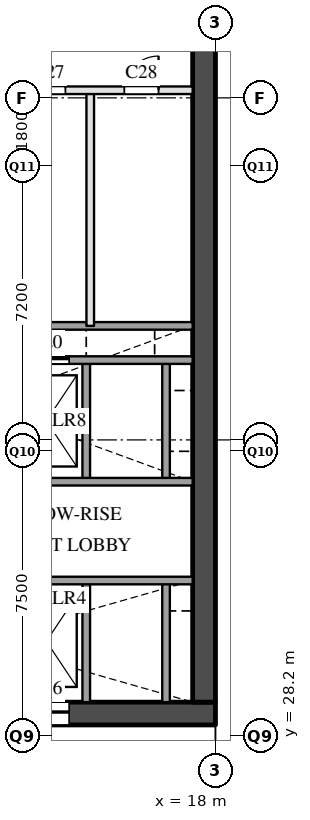
"""IFC4 building model, lengths in metres.
Left out: names, types, materials, properties, quantities, classifications, styles, units other than length and angle.
Written with IfcOpenShell. Run it as: python <this file> out.ifc"""

import sys

from ifc_helpers import new_model, si_unit, direction, frame, frame_2d, origin, place, context, subcontext, project, spatial, rectangle, extrude, element, fill, save


model = new_model("IFC4")
c1 = context("Model", 3, precision=1e-05, world=origin(), true_north=direction((0.0, 1.0)))
c2 = subcontext(c1, "Body", "Model", "MODEL_VIEW")
j1 = project(units=[si_unit("LENGTHUNIT", "METRE"), si_unit("PLANEANGLEUNIT", "RADIAN")], contexts=[c1])
p1 = place(None, origin())
s1 = spatial("IfcSite", under=j1, at=p1, CompositionType="ELEMENT")
p2 = place(p1, origin())
s2 = spatial("IfcBuilding", under=s1, at=p2, CompositionType="ELEMENT")
p3 = place(p2, frame((0.0, 0.0, 8.0)))
s3 = spatial("IfcBuildingStorey", under=s2, at=p3, CompositionType="ELEMENT", Elevation=8.0)
p4 = place(p3, frame((5.6, 28.8, 0.0), z_axis=(0.0, 0.0, 1.0), x_axis=(1.0, 0.0, 0.0)))
e1 = element("IfcWall", 1, at=p4, inside=s3, PredefinedType="SHEAR", context=c2, shape_type="SweptSolid", body=[
    extrude(rectangle(XDim=12.4, YDim=0.6, at=frame_2d((6.2, 0.0))), origin(), (0.0, 0.0, 1.0), 5.59),
])
p5 = place(p4, frame((1.05, 0.0, 0.0)))
e2 = element("IfcOpeningElement", 2, at=p5, cuts=e1, PredefinedType="OPENING", context=c2, shape_type="SweptSolid", body=[
    extrude(rectangle(XDim=1.2, YDim=2.1, at=frame_2d((0.6, 1.05))), frame((0.0, 0.31, 0.0), z_axis=(0.0, -1.0, 0.0), x_axis=(1.0, 0.0, 0.0)), (0.0, 0.0, 1.0), 0.62),
])
p6 = place(p4, frame((5.25, 0.0, 0.0)))
e3 = element("IfcOpeningElement", 3, at=p6, cuts=e1, PredefinedType="OPENING", context=c2, shape_type="SweptSolid", body=[
    extrude(rectangle(XDim=1.2, YDim=2.1, at=frame_2d((0.6, 1.05))), frame((0.0, 0.31, 0.0), z_axis=(0.0, -1.0, 0.0), x_axis=(1.0, 0.0, 0.0)), (0.0, 0.0, 1.0), 0.62),
])
p7 = place(p4, frame((7.35, 0.0, 0.0)))
e4 = element("IfcOpeningElement", 4, at=p7, cuts=e1, PredefinedType="OPENING", context=c2, shape_type="SweptSolid", body=[
    extrude(rectangle(XDim=1.2, YDim=2.1, at=frame_2d((0.6, 1.05))), frame((0.0, 0.31, 0.0), z_axis=(0.0, -1.0, 0.0), x_axis=(1.0, 0.0, 0.0)), (0.0, 0.0, 1.0), 0.62),
])
p8 = place(p3, frame((17.7, 29.1, 0.0), z_axis=(0.0, 0.0, 1.0), x_axis=(0.0, 1.0, 0.0)))
e5 = element("IfcWall", 5, at=p8, inside=s3, PredefinedType="SHEAR", context=c2, shape_type="SweptSolid", body=[
    extrude(rectangle(XDim=20.3, YDim=0.6, at=frame_2d((10.15, 0.0))), origin(), (0.0, 0.0, 1.0), 5.59),
])
p9 = place(p3, frame((14.6, 29.1, 0.0), z_axis=(0.0, 0.0, 1.0), x_axis=(0.0, 1.0, 0.0)))
e6 = element("IfcWall", 6, at=p9, inside=s3, PredefinedType="SOLIDWALL", context=c2, shape_type="SweptSolid", body=[
    extrude(rectangle(XDim=3.2, YDim=0.2, at=frame_2d((1.6, 0.0))), origin(), (0.0, 0.0, 1.0), 5.59),
])
p10 = place(p3, frame((14.6, 34.9, 0.0), z_axis=(0.0, 0.0, 1.0), x_axis=(0.0, 1.0, 0.0)))
e7 = element("IfcWall", 7, at=p10, inside=s3, PredefinedType="SOLIDWALL", context=c2, shape_type="SweptSolid", body=[
    extrude(rectangle(XDim=3.2, YDim=0.2, at=frame_2d((1.6, 0.0))), origin(), (0.0, 0.0, 1.0), 5.59),
])
p11 = place(p3, frame((14.705, 39.0, 0.0), z_axis=(0.0, 0.0, 1.0), x_axis=(0.0, 1.0, 0.0)))
e8 = element("IfcWall", 8, at=p11, inside=s3, PredefinedType="PARTITIONING", context=c2, shape_type="SweptSolid", body=[
    extrude(rectangle(XDim=6.2, YDim=0.2, at=frame_2d((3.1, 0.0))), origin(), (0.0, 0.0, 1.0), 5.59),
])
p12 = place(p3, frame((16.7, 29.1, 0.0), z_axis=(0.0, 0.0, 1.0), x_axis=(0.0, 1.0, 0.0)))
e9 = element("IfcWall", 9, at=p12, inside=s3, PredefinedType="SOLIDWALL", context=c2, shape_type="SweptSolid", body=[
    extrude(rectangle(XDim=3.2, YDim=0.2, at=frame_2d((1.6, 0.0))), origin(), (0.0, 0.0, 1.0), 5.59),
])
p13 = place(p3, frame((16.7, 34.9, 0.0), z_axis=(0.0, 0.0, 1.0), x_axis=(0.0, 1.0, 0.0)))
e10 = element("IfcWall", 10, at=p13, inside=s3, PredefinedType="SOLIDWALL", context=c2, shape_type="SweptSolid", body=[
    extrude(rectangle(XDim=3.2, YDim=0.2, at=frame_2d((1.6, 0.0))), origin(), (0.0, 0.0, 1.0), 5.59),
])
p14 = place(p3, frame((6.2, 32.3, 0.0), z_axis=(0.0, 0.0, 1.0), x_axis=(1.0, 0.0, 0.0)))
e11 = element("IfcWall", 11, at=p14, inside=s3, PredefinedType="SOLIDWALL", context=c2, shape_type="SweptSolid", body=[
    extrude(rectangle(XDim=11.2, YDim=0.2, at=frame_2d((5.6, 0.0))), origin(), (0.0, 0.0, 1.0), 5.59),
])
p15 = place(p14, frame((2.55, 0.0, 0.0)))
e12 = element("IfcOpeningElement", 12, at=p15, cuts=e11, PredefinedType="OPENING", context=c2, shape_type="SweptSolid", body=[
    extrude(rectangle(XDim=1.2, YDim=2.1, at=frame_2d((0.6, 1.05))), frame((0.0, 0.11, 0.0), z_axis=(0.0, -1.0, 0.0), x_axis=(1.0, 0.0, 0.0)), (0.0, 0.0, 1.0), 0.22),
])
p16 = place(p3, frame((6.2, 34.9, 0.0), z_axis=(0.0, 0.0, 1.0), x_axis=(1.0, 0.0, 0.0)))
e13 = element("IfcWall", 13, at=p16, inside=s3, PredefinedType="SOLIDWALL", context=c2, shape_type="SweptSolid", body=[
    extrude(rectangle(XDim=11.2, YDim=0.2, at=frame_2d((5.6, 0.0))), origin(), (0.0, 0.0, 1.0), 5.59),
])
p17 = place(p3, frame((6.2, 38.1, 0.0), z_axis=(0.0, 0.0, 1.0), x_axis=(1.0, 0.0, 0.0)))
e14 = element("IfcWall", 14, at=p17, inside=s3, PredefinedType="SOLIDWALL", context=c2, shape_type="SweptSolid", body=[
    extrude(rectangle(XDim=11.2, YDim=0.2, at=frame_2d((5.6, 0.0))), origin(), (0.0, 0.0, 1.0), 5.59),
])
p18 = place(p17, frame((0.45, 0.0, 0.0)))
e15 = element("IfcOpeningElement", 15, at=p18, cuts=e14, PredefinedType="OPENING", context=c2, shape_type="SweptSolid", body=[
    extrude(rectangle(XDim=1.2, YDim=2.1, at=frame_2d((0.6, 1.05))), frame((0.0, 0.11, 0.0), z_axis=(0.0, -1.0, 0.0), x_axis=(1.0, 0.0, 0.0)), (0.0, 0.0, 1.0), 0.22),
])
p19 = place(p17, frame((2.55, 0.0, 0.0)))
e16 = element("IfcOpeningElement", 16, at=p19, cuts=e14, PredefinedType="OPENING", context=c2, shape_type="SweptSolid", body=[
    extrude(rectangle(XDim=1.2, YDim=2.1, at=frame_2d((0.6, 1.05))), frame((0.0, 0.11, 0.0), z_axis=(0.0, -1.0, 0.0), x_axis=(1.0, 0.0, 0.0)), (0.0, 0.0, 1.0), 0.22),
])
p20 = place(p17, frame((4.65, 0.0, 0.0)))
e17 = element("IfcOpeningElement", 17, at=p20, cuts=e14, PredefinedType="OPENING", context=c2, shape_type="SweptSolid", body=[
    extrude(rectangle(XDim=1.2, YDim=2.1, at=frame_2d((0.6, 1.05))), frame((0.0, 0.11, 0.0), z_axis=(0.0, -1.0, 0.0), x_axis=(1.0, 0.0, 0.0)), (0.0, 0.0, 1.0), 0.22),
])
p21 = place(p17, frame((6.75, 0.0, 0.0)))
e18 = element("IfcOpeningElement", 18, at=p21, cuts=e14, PredefinedType="OPENING", context=c2, shape_type="SweptSolid", body=[
    extrude(rectangle(XDim=1.2, YDim=2.1, at=frame_2d((0.6, 1.05))), frame((0.0, 0.11, 0.0), z_axis=(0.0, -1.0, 0.0), x_axis=(1.0, 0.0, 0.0)), (0.0, 0.0, 1.0), 0.22),
])
p22 = place(p3, frame((12.5, 39.0, 0.0), z_axis=(0.0, 0.0, 1.0), x_axis=(1.0, 0.0, 0.0)))
e19 = element("IfcWall", 19, at=p22, inside=s3, PredefinedType="SOLIDWALL", context=c2, shape_type="SweptSolid", body=[
    extrude(rectangle(XDim=4.9, YDim=0.2, at=frame_2d((2.45, 0.0))), origin(), (0.0, 0.0, 1.0), 5.59),
])
p23 = place(p3, frame((12.5, 45.2, 0.0), z_axis=(0.0, 0.0, 1.0), x_axis=(1.0, 0.0, 0.0)))
e20 = element("IfcWall", 20, at=p23, inside=s3, PredefinedType="PARTITIONING", context=c2, shape_type="SweptSolid", body=[
    extrude(rectangle(XDim=4.9, YDim=0.2, at=frame_2d((2.45, 0.0))), origin(), (0.0, 0.0, 1.0), 5.59),
])
p24 = place(p23, frame((0.653, 0.0, 0.0)))
e21 = element("IfcOpeningElement", 21, at=p24, cuts=e20, PredefinedType="OPENING", context=c2, shape_type="SweptSolid", body=[
    extrude(rectangle(XDim=0.9, YDim=2.1, at=frame_2d((0.45, 1.05))), frame((0.0, 0.11, 0.0), z_axis=(0.0, -1.0, 0.0), x_axis=(1.0, 0.0, 0.0)), (0.0, 0.0, 1.0), 0.22),
])
p25 = place(p23, frame((3.103, 0.0, 0.0)))
e22 = element("IfcOpeningElement", 22, at=p25, cuts=e20, PredefinedType="OPENING", context=c2, shape_type="SweptSolid", body=[
    extrude(rectangle(XDim=0.9, YDim=2.1, at=frame_2d((0.45, 1.05))), frame((0.0, 0.11, 0.0), z_axis=(0.0, -1.0, 0.0), x_axis=(1.0, 0.0, 0.0)), (0.0, 0.0, 1.0), 0.22),
])
p26 = place(p7, origin())
e23 = element("IfcDoor", 23, at=p26, inside=s3, OperationType="SLIDING_TO_LEFT", PredefinedType="DOOR", context=c2, shape_type="SweptSolid", body=[
    extrude(rectangle(XDim=1.2, YDim=2.1, at=frame_2d((0.6, 1.05))), frame((0.0, 0.025, 0.0), z_axis=(0.0, -1.0, 0.0), x_axis=(1.0, 0.0, 0.0)), (0.0, 0.0, 1.0), 0.05),
])
fill(e4, e23)
p27 = place(p21, origin())
e24 = element("IfcDoor", 24, at=p27, inside=s3, OperationType="SLIDING_TO_LEFT", PredefinedType="DOOR", context=c2, shape_type="SweptSolid", body=[
    extrude(rectangle(XDim=1.2, YDim=2.1, at=frame_2d((0.6, 1.05))), frame((0.0, 0.025, 0.0), z_axis=(0.0, -1.0, 0.0), x_axis=(1.0, 0.0, 0.0)), (0.0, 0.0, 1.0), 0.05),
])
fill(e18, e24)
p28 = place(p24, origin())
e25 = element("IfcDoor", 25, at=p28, inside=s3, OperationType="SINGLE_SWING_LEFT", PredefinedType="DOOR", context=c2, shape_type="SweptSolid", body=[
    extrude(rectangle(XDim=0.9, YDim=2.1, at=frame_2d((0.45, 1.05))), frame((0.0, 0.025, 0.0), z_axis=(0.0, -1.0, 0.0), x_axis=(1.0, 0.0, 0.0)), (0.0, 0.0, 1.0), 0.05),
])
fill(e21, e25)
p29 = place(p25, origin())
e26 = element("IfcDoor", 26, at=p29, inside=s3, OperationType="SINGLE_SWING_RIGHT", PredefinedType="DOOR", context=c2, shape_type="SweptSolid", body=[
    extrude(rectangle(XDim=0.9, YDim=2.1, at=frame_2d((0.45, 1.05))), frame((0.0, 0.025, 0.0), z_axis=(0.0, -1.0, 0.0), x_axis=(1.0, 0.0, 0.0)), (0.0, 0.0, 1.0), 0.05),
])
fill(e22, e26)
save(model, sys.argv[1])
